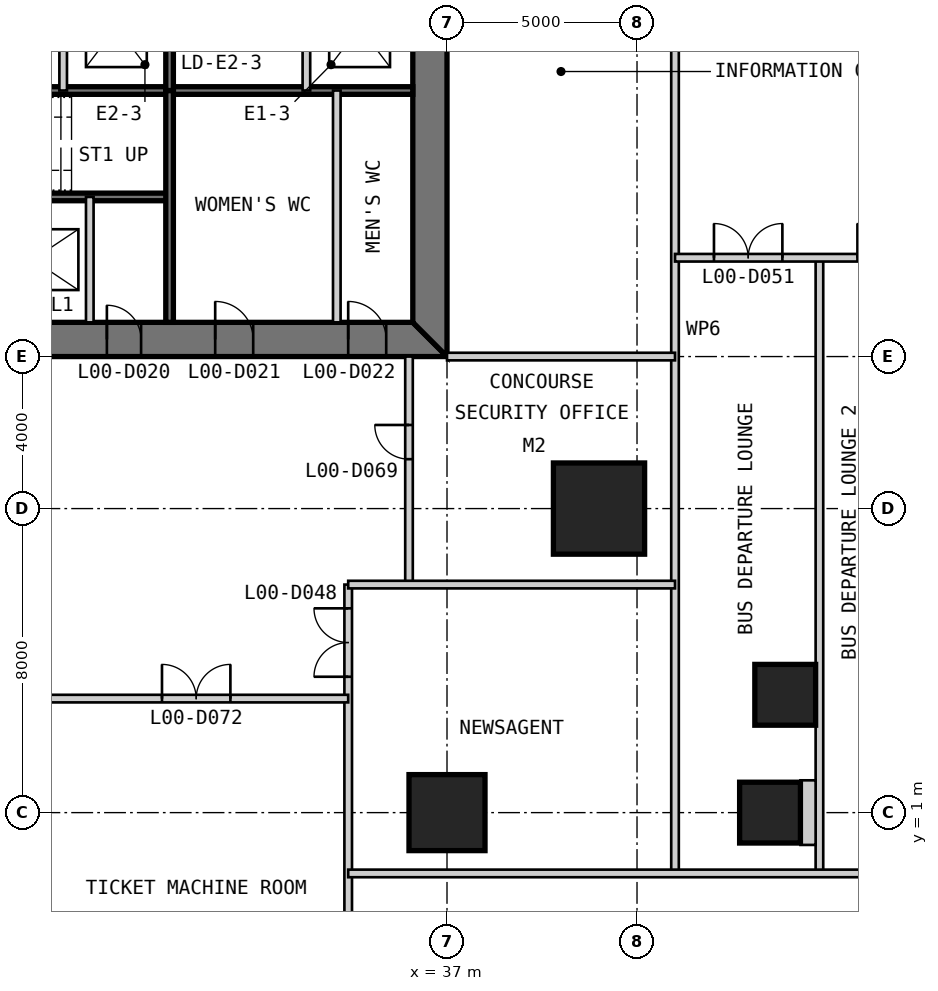
"""IFC4 building model, lengths in metres.
Left out: names, types, materials, properties, quantities, classifications, styles, units other than length and angle.
Written with IfcOpenShell. Run it as: python <this file> out.ifc"""

import sys

from ifc_helpers import new_model, si_unit, direction, frame, frame_2d, origin, origin_2d, place, context, subcontext, project, spatial, polyline, rectangle, outline, extrude, element, fill, save


model = new_model("IFC4")
c1 = context("Model", 3, precision=1e-05, world=origin(), true_north=direction((0.0, 1.0)))
c2 = subcontext(c1, "Body", "Model", "MODEL_VIEW")
j1 = project(units=[si_unit("LENGTHUNIT", "METRE"), si_unit("PLANEANGLEUNIT", "RADIAN")], contexts=[c1])
p1 = place(None, origin())
s1 = spatial("IfcSite", under=j1, at=p1, CompositionType="ELEMENT")
p2 = place(p1, origin())
s2 = spatial("IfcBuilding", under=s1, at=p2, CompositionType="ELEMENT")
p3 = place(p2, origin())
s3 = spatial("IfcBuildingStorey", under=s2, at=p3, CompositionType="ELEMENT", Elevation=0.0)
p4 = place(p3, frame((41.0, 9.0, 0.0), z_axis=(0.0, 0.0, 1.0), x_axis=(1.0, 0.0, 0.0)))
e1 = element("IfcColumn", 1, at=p4, inside=s3, PredefinedType="COLUMN", context=c2, shape_type="SweptSolid", body=[
    extrude(rectangle(XDim=2.4, YDim=2.4, at=origin_2d()), origin(), (0.0, 0.0, 1.0), 7.0),
])
p5 = place(p3, frame((37.0, 1.0, 0.0), z_axis=(0.0, 0.0, 1.0), x_axis=(1.0, 0.0, 0.0)))
e2 = element("IfcColumn", 2, at=p5, inside=s3, PredefinedType="COLUMN", context=c2, shape_type="SweptSolid", body=[
    extrude(rectangle(XDim=2.0, YDim=2.0, at=origin_2d()), origin(), (0.0, 0.0, 1.0), 7.0),
])
for number, where, z_axis, x_axis in (
    (3, (45.5, 1.0, 0.0), (0.0, 0.0, 1.0), (1.0, 0.0, 0.0)),
    (4, (45.9, 4.1, 0.0), (0.0, 0.0, 1.0), (1.0, 0.0, 0.0)),
):
    element("IfcColumn", number, at=place(p3, frame(where, z_axis=z_axis, x_axis=x_axis)), inside=s3, PredefinedType="COLUMN", context=c2, shape_type="SweptSolid", body=[
        extrude(rectangle(XDim=1.6, YDim=1.6, at=origin_2d()), origin(), (0.0, 0.0, 1.0), 7.0),
    ])
p6 = place(p3, frame((13.0, 13.45, 0.0), z_axis=(0.0, 0.0, 1.0), x_axis=(1.0, 0.0, 0.0)))
e5 = element("IfcWall", 5, at=p6, inside=s3, PredefinedType="SHEAR", context=c2, shape_type="SweptSolid", body=[
    extrude(outline(polyline([(0.0, -0.45), (24.0, -0.45), (23.1, 0.45), (0.9, 0.45), (0.0, -0.45)])), origin(), (0.0, 0.0, 1.0), 7.0),
])
p7 = place(p6, frame((4.9, 0.0, 0.0)))
e6 = element("IfcOpeningElement", 6, at=p7, cuts=e5, PredefinedType="OPENING", context=c2, shape_type="SweptSolid", body=[
    extrude(rectangle(XDim=1.0, YDim=2.2, at=frame_2d((0.5, 1.1))), frame((0.0, 0.46, 0.0), z_axis=(0.0, -1.0, 0.0), x_axis=(1.0, 0.0, 0.0)), (0.0, 0.0, 1.0), 0.92),
])
p8 = place(p6, frame((8.9, 0.0, 0.0)))
e7 = element("IfcOpeningElement", 7, at=p8, cuts=e5, PredefinedType="OPENING", context=c2, shape_type="SweptSolid", body=[
    extrude(rectangle(XDim=1.1, YDim=2.2, at=frame_2d((0.55, 1.1))), frame((0.0, 0.46, 0.0), z_axis=(0.0, -1.0, 0.0), x_axis=(1.0, 0.0, 0.0)), (0.0, 0.0, 1.0), 0.92),
])
p9 = place(p6, frame((15.05, 0.0, 0.0)))
e8 = element("IfcOpeningElement", 8, at=p9, cuts=e5, PredefinedType="OPENING", context=c2, shape_type="SweptSolid", body=[
    extrude(rectangle(XDim=0.9, YDim=2.2, at=frame_2d((0.45, 1.1))), frame((0.0, 0.46, 0.0), z_axis=(0.0, -1.0, 0.0), x_axis=(1.0, 0.0, 0.0)), (0.0, 0.0, 1.0), 0.92),
])
p10 = place(p6, frame((17.9, 0.0, 0.0)))
e9 = element("IfcOpeningElement", 9, at=p10, cuts=e5, PredefinedType="OPENING", context=c2, shape_type="SweptSolid", body=[
    extrude(rectangle(XDim=1.0, YDim=2.2, at=frame_2d((0.5, 1.1))), frame((0.0, 0.46, 0.0), z_axis=(0.0, -1.0, 0.0), x_axis=(1.0, 0.0, 0.0)), (0.0, 0.0, 1.0), 0.92),
])
p11 = place(p6, frame((21.4, 0.0, 0.0)))
e10 = element("IfcOpeningElement", 10, at=p11, cuts=e5, PredefinedType="OPENING", context=c2, shape_type="SweptSolid", body=[
    extrude(rectangle(XDim=1.0, YDim=2.2, at=frame_2d((0.5, 1.1))), frame((0.0, 0.46, 0.0), z_axis=(0.0, -1.0, 0.0), x_axis=(1.0, 0.0, 0.0)), (0.0, 0.0, 1.0), 0.92),
])
p12 = place(p3, frame((36.55, 13.9, 0.0), z_axis=(0.0, 0.0, 1.0), x_axis=(0.0, 1.0, 0.0)))
e11 = element("IfcWall", 11, at=p12, inside=s3, PredefinedType="SHEAR", context=c2, shape_type="SweptSolid", body=[
    extrude(outline(polyline([(-0.9, -0.45), (23.1, -0.45), (22.2, 0.45), (0.0, 0.45), (-0.9, -0.45)])), origin(), (0.0, 0.0, 1.0), 7.0),
])
p13 = place(p12, frame((20.2, 0.0, 0.0)))
e12 = element("IfcOpeningElement", 12, at=p13, cuts=e11, PredefinedType="OPENING", context=c2, shape_type="SweptSolid", body=[
    extrude(rectangle(XDim=1.0, YDim=2.2, at=frame_2d((0.5, 1.1))), frame((0.0, 0.46, 0.0), z_axis=(0.0, -1.0, 0.0), x_axis=(1.0, 0.0, 0.0)), (0.0, 0.0, 1.0), 0.92),
])
p14 = place(p12, frame((17.25, 0.0, 0.0)))
e13 = element("IfcOpeningElement", 13, at=p14, cuts=e11, PredefinedType="OPENING", context=c2, shape_type="SweptSolid", body=[
    extrude(rectangle(XDim=0.9, YDim=2.2, at=frame_2d((0.45, 1.1))), frame((0.0, 0.46, 0.0), z_axis=(0.0, -1.0, 0.0), x_axis=(1.0, 0.0, 0.0)), (0.0, 0.0, 1.0), 0.92),
])
p15 = place(p3, frame((20.3, 17.2, 0.0), z_axis=(0.0, 0.0, 1.0), x_axis=(1.0, 0.0, 0.0)))
e14 = element("IfcWall", 14, at=p15, inside=s3, PredefinedType="SOLIDWALL", context=c2, shape_type="SweptSolid", body=[
    extrude(rectangle(XDim=9.4, YDim=0.2, at=frame_2d((4.7, 0.0))), origin(), (0.0, 0.0, 1.0), 6.8),
])
p16 = place(p15, frame((0.25, 0.0, 0.0)))
e15 = element("IfcOpeningElement", 15, at=p16, cuts=e14, PredefinedType="OPENING", context=c2, shape_type="SweptSolid", body=[
    extrude(rectangle(XDim=1.0, YDim=2.2, at=frame_2d((0.5, 1.1))), frame((0.0, 0.11, 0.0), z_axis=(0.0, -1.0, 0.0), x_axis=(1.0, 0.0, 0.0)), (0.0, 0.0, 1.0), 0.22),
])
p17 = place(p3, frame((20.3, 20.0, 0.0), z_axis=(0.0, 0.0, 1.0), x_axis=(1.0, 0.0, 0.0)))
e16 = element("IfcWall", 16, at=p17, inside=s3, PredefinedType="SOLIDWALL", context=c2, shape_type="SweptSolid", body=[
    extrude(rectangle(XDim=15.8, YDim=0.2, at=frame_2d((7.9, 0.0))), origin(), (0.0, 0.0, 1.0), 6.8),
])
p18 = place(p3, frame((27.6, 13.9, 0.0), z_axis=(0.0, 0.0, 1.0), x_axis=(0.0, 1.0, 0.0)))
e17 = element("IfcWall", 17, at=p18, inside=s3, PredefinedType="PARTITIONING", context=c2, shape_type="SweptSolid", body=[
    extrude(rectangle(XDim=3.3, YDim=0.2, at=frame_2d((1.65, 0.0))), origin(), (0.0, 0.0, 1.0), 6.8),
])
p19 = place(p3, frame((29.7, 13.9, 0.0), z_axis=(0.0, 0.0, 1.0), x_axis=(0.0, 1.0, 0.0)))
e18 = element("IfcWall", 18, at=p19, inside=s3, PredefinedType="SOLIDWALL", context=c2, shape_type="SweptSolid", body=[
    extrude(rectangle(XDim=6.1, YDim=0.2, at=frame_2d((3.05, 0.0))), origin(), (0.0, 0.0, 1.0), 6.8),
])
p20 = place(p3, frame((34.1, 13.9, 0.0), z_axis=(0.0, 0.0, 1.0), x_axis=(0.0, 1.0, 0.0)))
e19 = element("IfcWall", 19, at=p20, inside=s3, PredefinedType="PARTITIONING", context=c2, shape_type="SweptSolid", body=[
    extrude(rectangle(XDim=6.1, YDim=0.2, at=frame_2d((3.05, 0.0))), origin(), (0.0, 0.0, 1.0), 6.8),
])
p21 = place(p3, frame((33.3, 36.1, 0.0), z_axis=(0.0, 0.0, 1.0), x_axis=(0.0, -1.0, 0.0)))
e20 = element("IfcWall", 20, at=p21, inside=s3, PredefinedType="PARTITIONING", context=c2, shape_type="SweptSolid", body=[
    extrude(rectangle(XDim=16.1, YDim=0.2, at=frame_2d((8.05, 0.0))), origin(), (0.0, 0.0, 1.0), 6.8),
])
p22 = place(p21, frame((4.4, 0.0, 0.0)))
e21 = element("IfcOpeningElement", 21, at=p22, cuts=e20, PredefinedType="OPENING", context=c2, shape_type="SweptSolid", body=[
    extrude(rectangle(XDim=0.9, YDim=2.2, at=frame_2d((0.45, 1.1))), frame((0.0, 0.11, 0.0), z_axis=(0.0, -1.0, 0.0), x_axis=(1.0, 0.0, 0.0)), (0.0, 0.0, 1.0), 0.22),
])
p23 = place(p21, frame((7.217, 0.0, 0.0)))
e22 = element("IfcOpeningElement", 22, at=p23, cuts=e20, PredefinedType="OPENING", context=c2, shape_type="SweptSolid", body=[
    extrude(rectangle(XDim=1.1, YDim=2.2, at=frame_2d((0.55, 1.1))), frame((0.0, 0.11, 0.0), z_axis=(0.0, -1.0, 0.0), x_axis=(1.0, 0.0, 0.0)), (0.0, 0.0, 1.0), 0.22),
])
p24 = place(p21, frame((10.55, 0.0, 0.0)))
e23 = element("IfcOpeningElement", 23, at=p24, cuts=e20, PredefinedType="OPENING", context=c2, shape_type="SweptSolid", body=[
    extrude(rectangle(XDim=1.1, YDim=2.2, at=frame_2d((0.55, 1.1))), frame((0.0, 0.11, 0.0), z_axis=(0.0, -1.0, 0.0), x_axis=(1.0, 0.0, 0.0)), (0.0, 0.0, 1.0), 0.22),
])
p25 = place(p21, frame((13.883, 0.0, 0.0)))
e24 = element("IfcOpeningElement", 24, at=p25, cuts=e20, PredefinedType="OPENING", context=c2, shape_type="SweptSolid", body=[
    extrude(rectangle(XDim=1.1, YDim=2.2, at=frame_2d((0.55, 1.1))), frame((0.0, 0.11, 0.0), z_axis=(0.0, -1.0, 0.0), x_axis=(1.0, 0.0, 0.0)), (0.0, 0.0, 1.0), 0.22),
])
p26 = place(p3, frame((29.7, 36.1, 0.0), z_axis=(0.0, 0.0, 1.0), x_axis=(0.0, -1.0, 0.0)))
e25 = element("IfcWall", 25, at=p26, inside=s3, PredefinedType="SOLIDWALL", context=c2, shape_type="SweptSolid", body=[
    extrude(rectangle(XDim=16.1, YDim=0.2, at=frame_2d((8.05, 0.0))), origin(), (0.0, 0.0, 1.0), 6.8),
])
p27 = place(p26, frame((7.217, 0.0, 0.0)))
e26 = element("IfcOpeningElement", 26, at=p27, cuts=e25, PredefinedType="OPENING", context=c2, shape_type="SweptSolid", body=[
    extrude(rectangle(XDim=1.1, YDim=2.2, at=frame_2d((0.55, 1.1))), frame((0.0, 0.11, 0.0), z_axis=(0.0, -1.0, 0.0), x_axis=(1.0, 0.0, 0.0)), (0.0, 0.0, 1.0), 0.22),
])
p28 = place(p26, frame((10.55, 0.0, 0.0)))
e27 = element("IfcOpeningElement", 27, at=p28, cuts=e25, PredefinedType="OPENING", context=c2, shape_type="SweptSolid", body=[
    extrude(rectangle(XDim=1.1, YDim=2.2, at=frame_2d((0.55, 1.1))), frame((0.0, 0.11, 0.0), z_axis=(0.0, -1.0, 0.0), x_axis=(1.0, 0.0, 0.0)), (0.0, 0.0, 1.0), 0.22),
])
p29 = place(p26, frame((13.883, 0.0, 0.0)))
e28 = element("IfcOpeningElement", 28, at=p29, cuts=e25, PredefinedType="OPENING", context=c2, shape_type="SweptSolid", body=[
    extrude(rectangle(XDim=1.1, YDim=2.2, at=frame_2d((0.55, 1.1))), frame((0.0, 0.11, 0.0), z_axis=(0.0, -1.0, 0.0), x_axis=(1.0, 0.0, 0.0)), (0.0, 0.0, 1.0), 0.22),
])
p30 = place(p3, frame((26.9, 30.0, 0.0), z_axis=(0.0, 0.0, 1.0), x_axis=(0.0, -1.0, 0.0)))
e29 = element("IfcWall", 29, at=p30, inside=s3, PredefinedType="PARTITIONING", context=c2, shape_type="SweptSolid", body=[
    extrude(rectangle(XDim=10.0, YDim=0.2, at=frame_2d((5.0, 0.0))), origin(), (0.0, 0.0, 1.0), 6.8),
])
p31 = place(p3, frame((34.4, -8.6, 0.0), z_axis=(0.0, 0.0, 1.0), x_axis=(0.0, 1.0, 0.0)))
e30 = element("IfcWall", 30, at=p31, inside=s3, PredefinedType="PARTITIONING", context=c2, shape_type="SweptSolid", body=[
    extrude(rectangle(XDim=15.6, YDim=0.2, at=frame_2d((7.8, 0.0))), origin(), (0.0, 0.0, 1.0), 6.7),
])
p32 = place(p31, frame((0.425, 0.0, 0.0)))
e31 = element("IfcOpeningElement", 31, at=p32, cuts=e30, PredefinedType="OPENING", context=c2, shape_type="SweptSolid", body=[
    extrude(rectangle(XDim=1.8, YDim=2.4, at=frame_2d((0.9, 1.2))), frame((0.0, 0.11, 0.0), z_axis=(0.0, -1.0, 0.0), x_axis=(1.0, 0.0, 0.0)), (0.0, 0.0, 1.0), 0.22),
])
p33 = place(p31, frame((13.175, 0.0, 0.0)))
e32 = element("IfcOpeningElement", 32, at=p33, cuts=e30, PredefinedType="OPENING", context=c2, shape_type="SweptSolid", body=[
    extrude(rectangle(XDim=1.8, YDim=2.4, at=frame_2d((0.9, 1.2))), frame((0.0, 0.11, 0.0), z_axis=(0.0, -1.0, 0.0), x_axis=(1.0, 0.0, 0.0)), (0.0, 0.0, 1.0), 0.22),
])
p34 = place(p3, frame((36.0, 7.0, 0.0), z_axis=(0.0, 0.0, 1.0), x_axis=(0.0, 1.0, 0.0)))
e33 = element("IfcWall", 33, at=p34, inside=s3, PredefinedType="PARTITIONING", context=c2, shape_type="SweptSolid", body=[
    extrude(rectangle(XDim=6.0, YDim=0.2, at=frame_2d((3.0, 0.0))), origin(), (0.0, 0.0, 1.0), 6.7),
])
p35 = place(p34, frame((3.3, 0.0, 0.0)))
e34 = element("IfcOpeningElement", 34, at=p35, cuts=e33, PredefinedType="OPENING", context=c2, shape_type="SweptSolid", body=[
    extrude(rectangle(XDim=0.9, YDim=2.2, at=frame_2d((0.45, 1.1))), frame((0.0, 0.11, 0.0), z_axis=(0.0, -1.0, 0.0), x_axis=(1.0, 0.0, 0.0)), (0.0, 0.0, 1.0), 0.22),
])
p36 = place(p3, frame((43.0, -0.6, 0.0), z_axis=(0.0, 0.0, 1.0), x_axis=(0.0, 1.0, 0.0)))
e35 = element("IfcWall", 35, at=p36, inside=s3, PredefinedType="PARTITIONING", context=c2, shape_type="SweptSolid", body=[
    extrude(rectangle(XDim=28.6, YDim=0.2, at=frame_2d((14.3, 0.0))), origin(), (0.0, 0.0, 1.0), 6.043),
])
for number, where, z_axis, x_axis in (
    (36, (46.8, -0.6, 0.0), (0.0, 0.0, 1.0), (0.0, 1.0, 0.0)),
    (37, (34.4, -0.6, 0.0), (0.0, 0.0, 1.0), (1.0, 0.0, 0.0)),
):
    element("IfcWall", number, at=place(p3, frame(where, z_axis=z_axis, x_axis=x_axis)), inside=s3, PredefinedType="PARTITIONING", context=c2, shape_type="SweptSolid", body=[
        extrude(rectangle(XDim=16.2, YDim=0.2, at=frame_2d((8.1, 0.0))), origin(), (0.0, 0.0, 1.0), 6.7),
    ])
p37 = place(p3, frame((26.4, 4.0, 0.0), z_axis=(0.0, 0.0, 1.0), x_axis=(1.0, 0.0, 0.0)))
e38 = element("IfcWall", 38, at=p37, inside=s3, PredefinedType="PARTITIONING", context=c2, shape_type="SweptSolid", body=[
    extrude(rectangle(XDim=8.0, YDim=0.2, at=frame_2d((4.0, 0.0))), origin(), (0.0, 0.0, 1.0), 6.7),
])
p38 = place(p37, frame((3.1, 0.0, 0.0)))
e39 = element("IfcOpeningElement", 39, at=p38, cuts=e38, PredefinedType="OPENING", context=c2, shape_type="SweptSolid", body=[
    extrude(rectangle(XDim=1.8, YDim=2.4, at=frame_2d((0.9, 1.2))), frame((0.0, 0.11, 0.0), z_axis=(0.0, -1.0, 0.0), x_axis=(1.0, 0.0, 0.0)), (0.0, 0.0, 1.0), 0.22),
])
p39 = place(p3, frame((34.4, 7.0, 0.0), z_axis=(0.0, 0.0, 1.0), x_axis=(1.0, 0.0, 0.0)))
e40 = element("IfcWall", 40, at=p39, inside=s3, PredefinedType="PARTITIONING", context=c2, shape_type="SweptSolid", body=[
    extrude(rectangle(XDim=8.6, YDim=0.2, at=frame_2d((4.3, 0.0))), origin(), (0.0, 0.0, 1.0), 6.7),
])
p40 = place(p3, frame((37.0, 13.0, 0.0), z_axis=(0.0, 0.0, 1.0), x_axis=(1.0, 0.0, 0.0)))
e41 = element("IfcWall", 41, at=p40, inside=s3, PredefinedType="PARTITIONING", context=c2, shape_type="SweptSolid", body=[
    extrude(rectangle(XDim=6.0, YDim=0.2, at=frame_2d((3.0, 0.0))), origin(), (0.0, 0.0, 1.0), 5.853),
])
p41 = place(p3, frame((43.0, 15.6, 0.0), z_axis=(0.0, 0.0, 1.0), x_axis=(1.0, 0.0, 0.0)))
e42 = element("IfcWall", 42, at=p41, inside=s3, PredefinedType="PARTITIONING", context=c2, shape_type="SweptSolid", body=[
    extrude(rectangle(XDim=22.25, YDim=0.2, at=frame_2d((11.125, 0.0))), origin(), (0.0, 0.0, 1.0), 6.7),
])
p42 = place(p41, frame((10.125, 0.0, 0.0)))
e43 = element("IfcOpeningElement", 43, at=p42, cuts=e42, PredefinedType="OPENING", context=c2, shape_type="SweptSolid", body=[
    extrude(rectangle(XDim=1.8, YDim=2.4, at=frame_2d((0.9, 1.2))), frame((0.0, 0.11, 0.0), z_axis=(0.0, -1.0, 0.0), x_axis=(1.0, 0.0, 0.0)), (0.0, 0.0, 1.0), 0.22),
])
p43 = place(p41, frame((17.425, 0.0, 0.0)))
e44 = element("IfcOpeningElement", 44, at=p43, cuts=e42, PredefinedType="OPENING", context=c2, shape_type="SweptSolid", body=[
    extrude(rectangle(XDim=1.8, YDim=2.4, at=frame_2d((0.9, 1.2))), frame((0.0, 0.11, 0.0), z_axis=(0.0, -1.0, 0.0), x_axis=(1.0, 0.0, 0.0)), (0.0, 0.0, 1.0), 0.22),
])
p44 = place(p41, frame((1.025, 0.0, 0.0)))
e45 = element("IfcOpeningElement", 45, at=p44, cuts=e42, PredefinedType="OPENING", context=c2, shape_type="SweptSolid", body=[
    extrude(rectangle(XDim=1.8, YDim=2.4, at=frame_2d((0.9, 1.2))), frame((0.0, 0.11, 0.0), z_axis=(0.0, -1.0, 0.0), x_axis=(1.0, 0.0, 0.0)), (0.0, 0.0, 1.0), 0.22),
])
p45 = place(p41, frame((4.8, 0.0, 0.0)))
e46 = element("IfcOpeningElement", 46, at=p45, cuts=e42, PredefinedType="OPENING", context=c2, shape_type="SweptSolid", body=[
    extrude(rectangle(XDim=1.8, YDim=2.4, at=frame_2d((0.9, 1.2))), frame((0.0, 0.11, 0.0), z_axis=(0.0, -1.0, 0.0), x_axis=(1.0, 0.0, 0.0)), (0.0, 0.0, 1.0), 0.22),
])
p46 = place(p3, frame((46.7, 1.0, 0.0), z_axis=(0.0, 0.0, 1.0), x_axis=(-1.0, 0.0, 0.0)))
e47 = element("IfcWall", 47, at=p46, inside=s3, PredefinedType="PARTITIONING", context=c2, shape_type="SweptSolid", body=[
    extrude(rectangle(XDim=0.4, YDim=1.7, at=frame_2d((0.2, 0.0))), origin(), (0.0, 0.0, 1.0), 6.7),
])
p47 = place(p9, origin())
e48 = element("IfcDoor", 48, at=p47, inside=s3, OperationType="SINGLE_SWING_LEFT", PredefinedType="DOOR", context=c2, shape_type="SweptSolid", body=[
    extrude(rectangle(XDim=0.9, YDim=2.2, at=frame_2d((0.45, 1.1))), frame((0.0, 0.025, 0.0), z_axis=(0.0, -1.0, 0.0), x_axis=(1.0, 0.0, 0.0)), (0.0, 0.0, 1.0), 0.05),
    extrude(outline(polyline([(0.0, 0.0), (0.04, 0.0), (0.04, 2.16), (0.86, 2.16), (0.86, 0.0), (0.9, 0.0), (0.9, 2.2), (0.0, 2.2), (0.0, 0.0)])), frame((0.0, 0.3, 0.0), z_axis=(0.0, -1.0, 0.0), x_axis=(1.0, 0.0, 0.0)), (0.0, 0.0, 1.0), 0.6),
])
fill(e8, e48)
p48 = place(p10, origin())
e49 = element("IfcDoor", 49, at=p48, inside=s3, OperationType="SINGLE_SWING_LEFT", PredefinedType="DOOR", context=c2, shape_type="SweptSolid", body=[
    extrude(rectangle(XDim=1.0, YDim=2.2, at=frame_2d((0.5, 1.1))), frame((0.0, 0.025, 0.0), z_axis=(0.0, -1.0, 0.0), x_axis=(1.0, 0.0, 0.0)), (0.0, 0.0, 1.0), 0.05),
    extrude(outline(polyline([(0.0, 0.0), (0.04, 0.0), (0.04, 2.16), (0.96, 2.16), (0.96, 0.0), (1.0, 0.0), (1.0, 2.2), (0.0, 2.2), (0.0, 0.0)])), frame((0.0, 0.3, 0.0), z_axis=(0.0, -1.0, 0.0), x_axis=(1.0, 0.0, 0.0)), (0.0, 0.0, 1.0), 0.6),
])
fill(e9, e49)
p49 = place(p11, origin())
e50 = element("IfcDoor", 50, at=p49, inside=s3, OperationType="SINGLE_SWING_LEFT", PredefinedType="DOOR", context=c2, shape_type="SweptSolid", body=[
    extrude(rectangle(XDim=1.0, YDim=2.2, at=frame_2d((0.5, 1.1))), frame((0.0, 0.025, 0.0), z_axis=(0.0, -1.0, 0.0), x_axis=(1.0, 0.0, 0.0)), (0.0, 0.0, 1.0), 0.05),
    extrude(outline(polyline([(0.0, 0.0), (0.04, 0.0), (0.04, 2.16), (0.96, 2.16), (0.96, 0.0), (1.0, 0.0), (1.0, 2.2), (0.0, 2.2), (0.0, 0.0)])), frame((0.0, 0.3, 0.0), z_axis=(0.0, -1.0, 0.0), x_axis=(1.0, 0.0, 0.0)), (0.0, 0.0, 1.0), 0.6),
])
fill(e10, e50)
p50 = place(p33, origin())
e51 = element("IfcDoor", 51, at=p50, inside=s3, OperationType="DOUBLE_DOOR_SINGLE_SWING", PredefinedType="DOOR", context=c2, shape_type="SweptSolid", body=[
    extrude(rectangle(XDim=1.8, YDim=2.4, at=frame_2d((0.9, 1.2))), frame((0.0, 0.025, 0.0), z_axis=(0.0, -1.0, 0.0), x_axis=(1.0, 0.0, 0.0)), (0.0, 0.0, 1.0), 0.05),
])
fill(e32, e51)
p51 = place(p44, origin())
e52 = element("IfcDoor", 52, at=p51, inside=s3, OperationType="DOUBLE_DOOR_SINGLE_SWING", PredefinedType="DOOR", context=c2, shape_type="SweptSolid", body=[
    extrude(rectangle(XDim=1.8, YDim=2.4, at=frame_2d((0.9, 1.2))), frame((0.0, 0.025, 0.0), z_axis=(0.0, -1.0, 0.0), x_axis=(1.0, 0.0, 0.0)), (0.0, 0.0, 1.0), 0.05),
])
fill(e45, e52)
p52 = place(p45, origin())
e53 = element("IfcDoor", 53, at=p52, inside=s3, OperationType="DOUBLE_DOOR_SINGLE_SWING", PredefinedType="DOOR", context=c2, shape_type="SweptSolid", body=[
    extrude(rectangle(XDim=1.8, YDim=2.4, at=frame_2d((0.9, 1.2))), frame((0.0, 0.025, 0.0), z_axis=(0.0, -1.0, 0.0), x_axis=(1.0, 0.0, 0.0)), (0.0, 0.0, 1.0), 0.05),
])
fill(e46, e53)
p53 = place(p35, origin())
e54 = element("IfcDoor", 54, at=p53, inside=s3, OperationType="SINGLE_SWING_RIGHT", PredefinedType="DOOR", context=c2, shape_type="SweptSolid", body=[
    extrude(rectangle(XDim=0.9, YDim=2.2, at=frame_2d((0.45, 1.1))), frame((0.0, 0.025, 0.0), z_axis=(0.0, -1.0, 0.0), x_axis=(1.0, 0.0, 0.0)), (0.0, 0.0, 1.0), 0.05),
])
fill(e34, e54)
p54 = place(p38, origin())
e55 = element("IfcDoor", 55, at=p54, inside=s3, OperationType="DOUBLE_DOOR_SINGLE_SWING", PredefinedType="DOOR", context=c2, shape_type="SweptSolid", body=[
    extrude(rectangle(XDim=1.8, YDim=2.4, at=frame_2d((0.9, 1.2))), frame((0.0, 0.025, 0.0), z_axis=(0.0, -1.0, 0.0), x_axis=(1.0, 0.0, 0.0)), (0.0, 0.0, 1.0), 0.05),
])
fill(e39, e55)
save(model, sys.argv[1])
